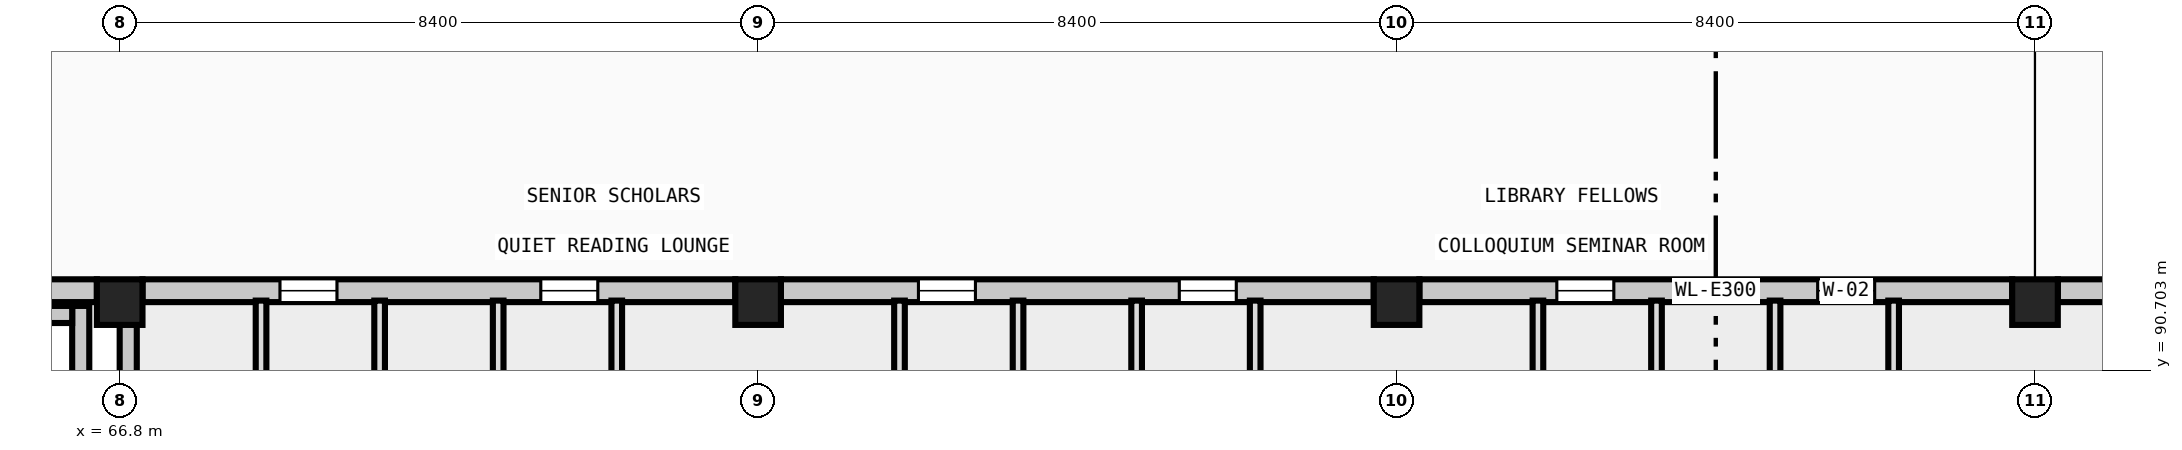
"""IFC4 building model, lengths in metres.
Left out: names, types, materials, properties, quantities, classifications, styles, units other than length and angle.
Written with IfcOpenShell. Run it as: python <this file> out.ifc"""

import sys

from ifc_helpers import new_model, si_unit, direction, frame, frame_2d, origin, origin_2d, place, context, subcontext, project, spatial, rectangle, extrude, element, fill, save


model = new_model("IFC4")
c1 = context("Model", 3, precision=1e-05, world=origin(), true_north=direction((0.0, 1.0)))
c2 = subcontext(c1, "Body", "Model", "MODEL_VIEW")
j1 = project(units=[si_unit("LENGTHUNIT", "METRE"), si_unit("PLANEANGLEUNIT", "RADIAN")], contexts=[c1])
p1 = place(None, origin())
s1 = spatial("IfcSite", under=j1, at=p1, CompositionType="ELEMENT")
p2 = place(p1, origin())
s2 = spatial("IfcBuilding", under=s1, at=p2, CompositionType="ELEMENT")
p3 = place(p2, frame((0.0, 0.0, 27.84)))
s3 = spatial("IfcBuildingStorey", under=s2, at=p3, CompositionType="ELEMENT", Elevation=27.84)
for number, where, z_axis, x_axis in (
    (1, (66.8, 91.6, 0.0), (0.0, 0.0, 1.0), (1.0, 0.0, 0.0)),
    (2, (75.2, 91.6, 0.0), (0.0, 0.0, 1.0), (1.0, 0.0, 0.0)),
    (3, (83.6, 91.6, 0.0), (0.0, 0.0, 1.0), (1.0, 0.0, 0.0)),
    (4, (92.0, 91.6, 0.0), (0.0, 0.0, 1.0), (1.0, 0.0, 0.0)),
):
    element("IfcColumn", number, at=place(p3, frame(where, z_axis=z_axis, x_axis=x_axis)), inside=s3, PredefinedType="COLUMN", context=c2, shape_type="SweptSolid", body=[
        extrude(rectangle(XDim=0.6, YDim=0.6, at=origin_2d()), origin(), (0.0, 0.0, 1.0), 4.48),
    ])
p4 = place(p3, frame((66.913, 88.8, 0.0), z_axis=(0.0, 0.0, 1.0), x_axis=(0.0, 1.0, 0.0)))
e5 = element("IfcWall", 5, at=p4, inside=s3, PredefinedType="PARAPET", context=c2, shape_type="SweptSolid", body=[
    extrude(rectangle(XDim=2.8, YDim=0.225, at=frame_2d((1.4, 0.0))), origin(), (0.0, 0.0, 1.0), 1.1),
])
p5 = place(p3, frame((66.288, 91.55, 0.0), z_axis=(0.0, 0.0, 1.0), x_axis=(0.0, -1.0, 0.0)))
e6 = element("IfcWall", 6, at=p5, inside=s3, PredefinedType="PARAPET", context=c2, shape_type="SweptSolid", body=[
    extrude(rectangle(XDim=2.75, YDim=0.225, at=frame_2d((1.375, 0.0))), origin(), (0.0, 0.0, 1.0), 1.1),
])
p6 = place(p3, frame((58.625, 91.438, 0.0), z_axis=(0.0, 0.0, 1.0), x_axis=(1.0, 0.0, 0.0)))
e7 = element("IfcWall", 7, at=p6, inside=s3, PredefinedType="PARAPET", context=c2, shape_type="SweptSolid", body=[
    extrude(rectangle(XDim=7.55, YDim=0.225, at=frame_2d((3.775, 0.0))), origin(), (0.0, 0.0, 1.0), 1.1),
])
p7 = place(p3, frame((100.1, 91.75, 0.0), z_axis=(0.0, 0.0, 1.0), x_axis=(-1.0, 0.0, 0.0)))
e8 = element("IfcWall", 8, at=p7, inside=s3, PredefinedType="SOLIDWALL", context=c2, shape_type="SweptSolid", body=[
    extrude(rectangle(XDim=7.8, YDim=0.3, at=frame_2d((3.9, 0.0))), origin(), (0.0, 0.0, 1.0), 3.93),
])
p8 = place(p7, frame((1.809, 0.0, 0.9)))
e9 = element("IfcOpeningElement", 9, at=p8, cuts=e8, PredefinedType="OPENING", context=c2, shape_type="SweptSolid", body=[
    extrude(rectangle(XDim=0.75, YDim=2.4, at=frame_2d((0.375, 1.2))), frame((0.0, 0.16, 0.0), z_axis=(0.0, -1.0, 0.0), x_axis=(1.0, 0.0, 0.0)), (0.0, 0.0, 1.0), 0.32),
])
p9 = place(p7, frame((5.241, 0.0, 0.9)))
e10 = element("IfcOpeningElement", 10, at=p9, cuts=e8, PredefinedType="OPENING", context=c2, shape_type="SweptSolid", body=[
    extrude(rectangle(XDim=0.75, YDim=2.4, at=frame_2d((0.375, 1.2))), frame((0.0, 0.16, 0.0), z_axis=(0.0, -1.0, 0.0), x_axis=(1.0, 0.0, 0.0)), (0.0, 0.0, 1.0), 0.32),
])
p10 = place(p3, frame((91.7, 91.75, 0.0), z_axis=(0.0, 0.0, 1.0), x_axis=(-1.0, 0.0, 0.0)))
e11 = element("IfcWall", 11, at=p10, inside=s3, PredefinedType="SOLIDWALL", context=c2, shape_type="SweptSolid", body=[
    extrude(rectangle(XDim=7.8, YDim=0.3, at=frame_2d((3.9, 0.0))), origin(), (0.0, 0.0, 1.0), 3.93),
])
p11 = place(p10, frame((1.809, 0.0, 0.9)))
e12 = element("IfcOpeningElement", 12, at=p11, cuts=e11, PredefinedType="OPENING", context=c2, shape_type="SweptSolid", body=[
    extrude(rectangle(XDim=0.75, YDim=2.4, at=frame_2d((0.375, 1.2))), frame((0.0, 0.16, 0.0), z_axis=(0.0, -1.0, 0.0), x_axis=(1.0, 0.0, 0.0)), (0.0, 0.0, 1.0), 0.32),
])
p12 = place(p10, frame((5.241, 0.0, 0.9)))
e13 = element("IfcOpeningElement", 13, at=p12, cuts=e11, PredefinedType="OPENING", context=c2, shape_type="SweptSolid", body=[
    extrude(rectangle(XDim=0.75, YDim=2.4, at=frame_2d((0.375, 1.2))), frame((0.0, 0.16, 0.0), z_axis=(0.0, -1.0, 0.0), x_axis=(1.0, 0.0, 0.0)), (0.0, 0.0, 1.0), 0.32),
])
p13 = place(p3, frame((83.3, 91.75, 0.0), z_axis=(0.0, 0.0, 1.0), x_axis=(-1.0, 0.0, 0.0)))
e14 = element("IfcWall", 14, at=p13, inside=s3, PredefinedType="SOLIDWALL", context=c2, shape_type="SweptSolid", body=[
    extrude(rectangle(XDim=7.8, YDim=0.3, at=frame_2d((3.9, 0.0))), origin(), (0.0, 0.0, 1.0), 3.93),
])
p14 = place(p13, frame((1.809, 0.0, 0.9)))
e15 = element("IfcOpeningElement", 15, at=p14, cuts=e14, PredefinedType="OPENING", context=c2, shape_type="SweptSolid", body=[
    extrude(rectangle(XDim=0.75, YDim=2.4, at=frame_2d((0.375, 1.2))), frame((0.0, 0.16, 0.0), z_axis=(0.0, -1.0, 0.0), x_axis=(1.0, 0.0, 0.0)), (0.0, 0.0, 1.0), 0.32),
])
p15 = place(p13, frame((5.241, 0.0, 0.9)))
e16 = element("IfcOpeningElement", 16, at=p15, cuts=e14, PredefinedType="OPENING", context=c2, shape_type="SweptSolid", body=[
    extrude(rectangle(XDim=0.75, YDim=2.4, at=frame_2d((0.375, 1.2))), frame((0.0, 0.16, 0.0), z_axis=(0.0, -1.0, 0.0), x_axis=(1.0, 0.0, 0.0)), (0.0, 0.0, 1.0), 0.32),
])
p16 = place(p3, frame((74.9, 91.75, 0.0), z_axis=(0.0, 0.0, 1.0), x_axis=(-1.0, 0.0, 0.0)))
e17 = element("IfcWall", 17, at=p16, inside=s3, PredefinedType="SOLIDWALL", context=c2, shape_type="SweptSolid", body=[
    extrude(rectangle(XDim=7.8, YDim=0.3, at=frame_2d((3.9, 0.0))), origin(), (0.0, 0.0, 1.0), 3.93),
])
p17 = place(p16, frame((1.809, 0.0, 0.9)))
e18 = element("IfcOpeningElement", 18, at=p17, cuts=e17, PredefinedType="OPENING", context=c2, shape_type="SweptSolid", body=[
    extrude(rectangle(XDim=0.75, YDim=2.4, at=frame_2d((0.375, 1.2))), frame((0.0, 0.16, 0.0), z_axis=(0.0, -1.0, 0.0), x_axis=(1.0, 0.0, 0.0)), (0.0, 0.0, 1.0), 0.32),
])
p18 = place(p16, frame((5.241, 0.0, 0.9)))
e19 = element("IfcOpeningElement", 19, at=p18, cuts=e17, PredefinedType="OPENING", context=c2, shape_type="SweptSolid", body=[
    extrude(rectangle(XDim=0.75, YDim=2.4, at=frame_2d((0.375, 1.2))), frame((0.0, 0.16, 0.0), z_axis=(0.0, -1.0, 0.0), x_axis=(1.0, 0.0, 0.0)), (0.0, 0.0, 1.0), 0.32),
])
p19 = place(p3, frame((66.5, 91.75, 0.0), z_axis=(0.0, 0.0, 1.0), x_axis=(-1.0, 0.0, 0.0)))
e20 = element("IfcWall", 20, at=p19, inside=s3, PredefinedType="SOLIDWALL", context=c2, shape_type="SweptSolid", body=[
    extrude(rectangle(XDim=7.8, YDim=0.3, at=frame_2d((3.9, 0.0))), origin(), (0.0, 0.0, 1.0), 3.93),
])
p20 = place(p19, frame((1.809, 0.0, 0.9)))
e21 = element("IfcOpeningElement", 21, at=p20, cuts=e20, PredefinedType="OPENING", context=c2, shape_type="SweptSolid", body=[
    extrude(rectangle(XDim=0.75, YDim=2.4, at=frame_2d((0.375, 1.2))), frame((0.0, 0.16, 0.0), z_axis=(0.0, -1.0, 0.0), x_axis=(1.0, 0.0, 0.0)), (0.0, 0.0, 1.0), 0.32),
])
p21 = place(p19, frame((5.241, 0.0, 0.9)))
e22 = element("IfcOpeningElement", 22, at=p21, cuts=e20, PredefinedType="OPENING", context=c2, shape_type="SweptSolid", body=[
    extrude(rectangle(XDim=0.75, YDim=2.4, at=frame_2d((0.375, 1.2))), frame((0.0, 0.16, 0.0), z_axis=(0.0, -1.0, 0.0), x_axis=(1.0, 0.0, 0.0)), (0.0, 0.0, 1.0), 0.32),
])
p22 = place(p11, origin())
e23 = element("IfcWindow", 23, at=p22, inside=s3, PartitioningType="SINGLE_PANEL", PredefinedType="WINDOW", context=c2, shape_type="SweptSolid", body=[
    extrude(rectangle(XDim=0.75, YDim=2.4, at=frame_2d((0.375, 1.2))), frame((0.0, 0.03, 0.0), z_axis=(0.0, -1.0, 0.0), x_axis=(1.0, 0.0, 0.0)), (0.0, 0.0, 1.0), 0.06),
])
fill(e12, e23)
p23 = place(p12, origin())
e24 = element("IfcWindow", 24, at=p23, inside=s3, PartitioningType="SINGLE_PANEL", PredefinedType="WINDOW", context=c2, shape_type="SweptSolid", body=[
    extrude(rectangle(XDim=0.75, YDim=2.4, at=frame_2d((0.375, 1.2))), frame((0.0, 0.03, 0.0), z_axis=(0.0, -1.0, 0.0), x_axis=(1.0, 0.0, 0.0)), (0.0, 0.0, 1.0), 0.06),
])
fill(e13, e24)
p24 = place(p14, origin())
e25 = element("IfcWindow", 25, at=p24, inside=s3, PartitioningType="SINGLE_PANEL", PredefinedType="WINDOW", context=c2, shape_type="SweptSolid", body=[
    extrude(rectangle(XDim=0.75, YDim=2.4, at=frame_2d((0.375, 1.2))), frame((0.0, 0.03, 0.0), z_axis=(0.0, -1.0, 0.0), x_axis=(1.0, 0.0, 0.0)), (0.0, 0.0, 1.0), 0.06),
])
fill(e15, e25)
p25 = place(p15, origin())
e26 = element("IfcWindow", 26, at=p25, inside=s3, PartitioningType="SINGLE_PANEL", PredefinedType="WINDOW", context=c2, shape_type="SweptSolid", body=[
    extrude(rectangle(XDim=0.75, YDim=2.4, at=frame_2d((0.375, 1.2))), frame((0.0, 0.03, 0.0), z_axis=(0.0, -1.0, 0.0), x_axis=(1.0, 0.0, 0.0)), (0.0, 0.0, 1.0), 0.06),
])
fill(e16, e26)
p26 = place(p17, origin())
e27 = element("IfcWindow", 27, at=p26, inside=s3, PartitioningType="SINGLE_PANEL", PredefinedType="WINDOW", context=c2, shape_type="SweptSolid", body=[
    extrude(rectangle(XDim=0.75, YDim=2.4, at=frame_2d((0.375, 1.2))), frame((0.0, 0.03, 0.0), z_axis=(0.0, -1.0, 0.0), x_axis=(1.0, 0.0, 0.0)), (0.0, 0.0, 1.0), 0.06),
])
fill(e18, e27)
p27 = place(p18, origin())
e28 = element("IfcWindow", 28, at=p27, inside=s3, PartitioningType="SINGLE_PANEL", PredefinedType="WINDOW", context=c2, shape_type="SweptSolid", body=[
    extrude(rectangle(XDim=0.75, YDim=2.4, at=frame_2d((0.375, 1.2))), frame((0.0, 0.03, 0.0), z_axis=(0.0, -1.0, 0.0), x_axis=(1.0, 0.0, 0.0)), (0.0, 0.0, 1.0), 0.06),
])
fill(e19, e28)
save(model, sys.argv[1])
